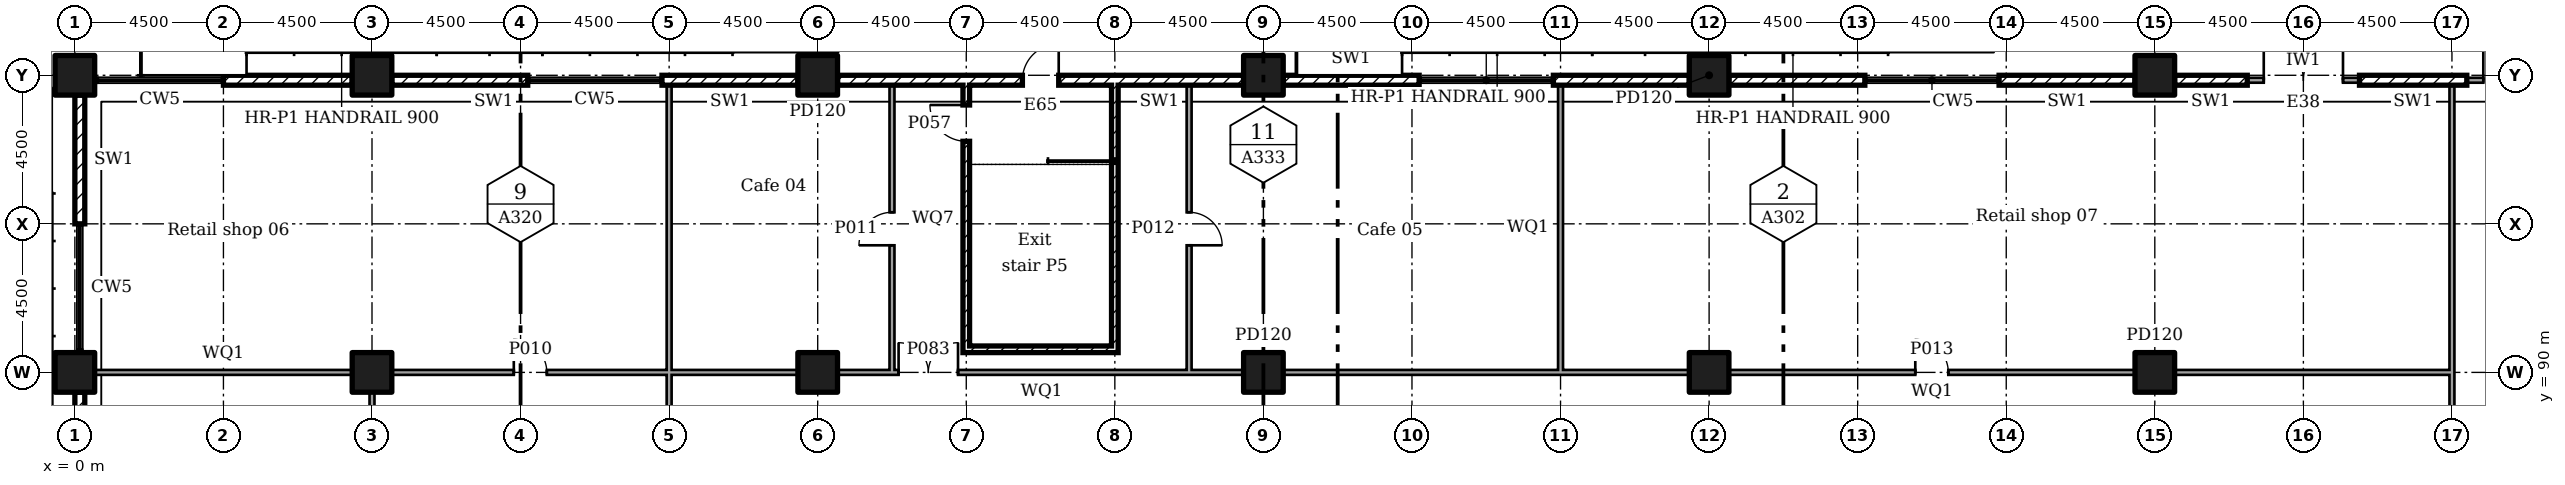
"""IFC4 building model, lengths in metres.
Left out: names, types, materials, properties, quantities, classifications, styles, units other than length and angle.
Written with IfcOpenShell. Run it as: python <this file> out.ifc"""

import sys

from ifc_helpers import new_model, si_unit, direction, frame, frame_2d, origin, origin_2d, place, context, subcontext, project, spatial, rectangle, extrude, element, fill, save


model = new_model("IFC4")
c1 = context("Model", 3, precision=1e-05, world=origin(), true_north=direction((0.0, 1.0)))
c2 = subcontext(c1, "Body", "Model", "MODEL_VIEW")
j1 = project(units=[si_unit("LENGTHUNIT", "METRE"), si_unit("PLANEANGLEUNIT", "RADIAN")], contexts=[c1])
p1 = place(None, origin())
s1 = spatial("IfcSite", under=j1, at=p1, CompositionType="ELEMENT")
p2 = place(p1, origin())
s2 = spatial("IfcBuilding", under=s1, at=p2, CompositionType="ELEMENT")
p3 = place(p2, origin())
s3 = spatial("IfcBuildingStorey", under=s2, at=p3, CompositionType="ELEMENT", Elevation=0.0)
for number, where in (
    (1, (0.0, 90.0, 0.0)),
    (2, (0.0, 99.0, 0.0)),
    (3, (9.0, 90.0, 0.0)),
    (4, (9.0, 99.0, 0.0)),
    (5, (22.5, 90.0, 0.0)),
    (6, (22.5, 99.0, 0.0)),
    (7, (36.0, 90.0, 0.0)),
    (8, (36.0, 99.0, 0.0)),
    (9, (49.5, 90.0, 0.0)),
    (10, (49.5, 99.0, 0.0)),
    (11, (63.0, 90.0, 0.0)),
    (12, (63.0, 99.0, 0.0)),
):
    element("IfcColumn", number, at=place(p3, frame(where)), inside=s3, PredefinedType="COLUMN", context=c2, shape_type="SweptSolid", body=[
        extrude(rectangle(XDim=1.2, YDim=1.2, at=origin_2d()), origin(), (0.0, 0.0, 1.0), 6.0),
    ])
p4 = place(p3, frame((75.9, 98.85, 0.0), z_axis=(0.0, 0.0, 1.0), x_axis=(-1.0, 0.0, 0.0)))
e13 = element("IfcWall", 13, at=p4, inside=s3, PredefinedType="SOLIDWALL", context=c2, shape_type="SweptSolid", body=[
    extrude(rectangle(XDim=3.45, YDim=0.15, at=frame_2d((1.725, 0.0))), origin(), (0.0, 0.0, 1.0), 5.55),
])
p5 = place(p4, frame((0.55, 0.0, 0.0)))
e14 = element("IfcOpeningElement", 14, at=p5, cuts=e13, PredefinedType="OPENING", context=c2, shape_type="SweptSolid", body=[
    extrude(rectangle(XDim=2.4, YDim=2.7, at=frame_2d((1.2, 1.35))), frame((0.0, 0.085, 0.0), z_axis=(0.0, -1.0, 0.0), x_axis=(1.0, 0.0, 0.0)), (0.0, 0.0, 1.0), 0.17),
])
p6 = place(p3, frame((72.45, 98.85, 0.0), z_axis=(0.0, 0.0, 1.0), x_axis=(-1.0, 0.0, 0.0)))
e15 = element("IfcWall", 15, at=p6, inside=s3, PredefinedType="ELEMENTEDWALL", context=c2, shape_type="SweptSolid", body=[
    extrude(rectangle(XDim=3.25, YDim=0.3, at=frame_2d((1.625, 0.0))), origin(), (0.0, 0.0, 1.0), 5.55),
])
p7 = place(p3, frame((69.2, 98.85, 0.0), z_axis=(0.0, 0.0, 1.0), x_axis=(-1.0, 0.0, 0.0)))
e16 = element("IfcWall", 16, at=p7, inside=s3, PredefinedType="SOLIDWALL", context=c2, shape_type="SweptSolid", body=[
    extrude(rectangle(XDim=3.4, YDim=0.15, at=frame_2d((1.7, 0.0))), origin(), (0.0, 0.0, 1.0), 5.55),
])
p8 = place(p7, frame((0.5, 0.0, 0.0)))
e17 = element("IfcOpeningElement", 17, at=p8, cuts=e16, PredefinedType="OPENING", context=c2, shape_type="SweptSolid", body=[
    extrude(rectangle(XDim=2.4, YDim=2.7, at=frame_2d((1.2, 1.35))), frame((0.0, 0.085, 0.0), z_axis=(0.0, -1.0, 0.0), x_axis=(1.0, 0.0, 0.0)), (0.0, 0.0, 1.0), 0.17),
])
p9 = place(p3, frame((65.8, 98.85, 0.0), z_axis=(0.0, 0.0, 1.0), x_axis=(-1.0, 0.0, 0.0)))
e18 = element("IfcWall", 18, at=p9, inside=s3, PredefinedType="ELEMENTEDWALL", context=c2, shape_type="SweptSolid", body=[
    extrude(rectangle(XDim=2.2, YDim=0.3, at=frame_2d((1.1, 0.0))), origin(), (0.0, 0.0, 1.0), 5.55),
])
for number, where, z_axis, x_axis in (
    (19, (62.4, 98.85, 0.0), (0.0, 0.0, 1.0), (-1.0, 0.0, 0.0)),
    (20, (54.217, 98.85, 0.0), (0.0, 0.0, 1.0), (-1.0, 0.0, 0.0)),
    (21, (48.9, 98.85, 0.0), (0.0, 0.0, 1.0), (-1.0, 0.0, 0.0)),
    (22, (40.717, 98.85, 0.0), (0.0, 0.0, 1.0), (-1.0, 0.0, 0.0)),
):
    element("IfcWall", number, at=place(p3, frame(where, z_axis=z_axis, x_axis=x_axis)), inside=s3, PredefinedType="ELEMENTEDWALL", context=c2, shape_type="SweptSolid", body=[
        extrude(rectangle(XDim=4.116, YDim=0.3, at=frame_2d((2.058, 0.0))), origin(), (0.0, 0.0, 1.0), 5.55),
    ])
p10 = place(p3, frame((35.4, 98.85, 0.0), z_axis=(0.0, 0.0, 1.0), x_axis=(-1.0, 0.0, 0.0)))
e23 = element("IfcWall", 23, at=p10, inside=s3, PredefinedType="ELEMENTEDWALL", context=c2, shape_type="SweptSolid", body=[
    extrude(rectangle(XDim=5.1, YDim=0.3, at=frame_2d((2.55, 0.0))), origin(), (0.0, 0.0, 1.0), 5.55),
])
p11 = place(p3, frame((30.3, 98.85, 0.0), z_axis=(0.0, 0.0, 1.0), x_axis=(-1.0, 0.0, 0.0)))
e24 = element("IfcWall", 24, at=p11, inside=s3, PredefinedType="ELEMENTEDWALL", context=c2, shape_type="SweptSolid", body=[
    extrude(rectangle(XDim=2.1, YDim=0.3, at=frame_2d((1.05, 0.0))), origin(), (0.0, 0.0, 1.0), 5.55),
])
p12 = place(p11, frame((0.5, 0.0, 0.0)))
e25 = element("IfcOpeningElement", 25, at=p12, cuts=e24, PredefinedType="OPENING", context=c2, shape_type="SweptSolid", body=[
    extrude(rectangle(XDim=1.1, YDim=2.4, at=frame_2d((0.55, 1.2))), frame((0.0, 0.16, 0.0), z_axis=(0.0, -1.0, 0.0), x_axis=(1.0, 0.0, 0.0)), (0.0, 0.0, 1.0), 0.32),
])
p13 = place(p3, frame((28.2, 98.85, 0.0), z_axis=(0.0, 0.0, 1.0), x_axis=(-1.0, 0.0, 0.0)))
e26 = element("IfcWall", 26, at=p13, inside=s3, PredefinedType="ELEMENTEDWALL", context=c2, shape_type="SweptSolid", body=[
    extrude(rectangle(XDim=5.1, YDim=0.3, at=frame_2d((2.55, 0.0))), origin(), (0.0, 0.0, 1.0), 5.55),
])
for number, where, z_axis, x_axis in (
    (27, (21.9, 98.85, 0.0), (0.0, 0.0, 1.0), (-1.0, 0.0, 0.0)),
    (28, (13.717, 98.85, 0.0), (0.0, 0.0, 1.0), (-1.0, 0.0, 0.0)),
):
    element("IfcWall", number, at=place(p3, frame(where, z_axis=z_axis, x_axis=x_axis)), inside=s3, PredefinedType="ELEMENTEDWALL", context=c2, shape_type="SweptSolid", body=[
        extrude(rectangle(XDim=4.116, YDim=0.3, at=frame_2d((2.058, 0.0))), origin(), (0.0, 0.0, 1.0), 5.55),
    ])
for number, where, z_axis, x_axis in (
    (29, (8.4, 98.85, 0.0), (0.0, 0.0, 1.0), (-1.0, 0.0, 0.0)),
    (30, (0.15, 98.4, 0.0), (0.0, 0.0, 1.0), (0.0, -1.0, 0.0)),
):
    element("IfcWall", number, at=place(p3, frame(where, z_axis=z_axis, x_axis=x_axis)), inside=s3, PredefinedType="ELEMENTEDWALL", context=c2, shape_type="SweptSolid", body=[
        extrude(rectangle(XDim=3.9, YDim=0.3, at=frame_2d((1.95, 0.0))), origin(), (0.0, 0.0, 1.0), 5.55),
    ])
p14 = place(p3, frame((0.15, 89.4, 0.0), z_axis=(0.0, 0.0, 1.0), x_axis=(0.0, -1.0, 0.0)))
e31 = element("IfcWall", 31, at=p14, inside=s3, PredefinedType="ELEMENTEDWALL", context=c2, shape_type="SweptSolid", body=[
    extrude(rectangle(XDim=4.116, YDim=0.3, at=frame_2d((2.058, 0.0))), origin(), (0.0, 0.0, 1.0), 5.55),
])
p15 = place(p3, frame((72.0, 80.925, 0.0), z_axis=(0.0, 0.0, 1.0), x_axis=(0.0, 1.0, 0.0)))
e32 = element("IfcWall", 32, at=p15, inside=s3, PredefinedType="PARTITIONING", context=c2, shape_type="SweptSolid", body=[
    extrude(rectangle(XDim=9.15, YDim=0.15, at=frame_2d((4.575, 0.0))), origin(), (0.0, 0.0, 1.0), 5.55),
])
p16 = place(p15, frame((3.675, 0.0, 0.0)))
e33 = element("IfcOpeningElement", 33, at=p16, cuts=e32, PredefinedType="OPENING", context=c2, shape_type="SweptSolid", body=[
    extrude(rectangle(XDim=1.8, YDim=2.1, at=frame_2d((0.9, 1.05))), frame((0.0, 0.085, 0.0), z_axis=(0.0, -1.0, 0.0), x_axis=(1.0, 0.0, 0.0)), (0.0, 0.0, 1.0), 0.17),
])
p17 = place(p3, frame((72.0, 90.0, 0.0), z_axis=(0.0, 0.0, 1.0), x_axis=(0.0, 1.0, 0.0)))
e34 = element("IfcWall", 34, at=p17, inside=s3, PredefinedType="PARTITIONING", context=c2, shape_type="SweptSolid", body=[
    extrude(rectangle(XDim=8.7, YDim=0.15, at=frame_2d((4.35, 0.0))), origin(), (0.0, 0.0, 1.0), 5.55),
])
p18 = place(p3, frame((18.0, 80.925, 0.0), z_axis=(0.0, 0.0, 1.0), x_axis=(0.0, 1.0, 0.0)))
e35 = element("IfcWall", 35, at=p18, inside=s3, PredefinedType="PARTITIONING", context=c2, shape_type="SweptSolid", body=[
    extrude(rectangle(XDim=9.15, YDim=0.15, at=frame_2d((4.575, 0.0))), origin(), (0.0, 0.0, 1.0), 5.55),
])
p19 = place(p18, frame((3.675, 0.0, 0.0)))
e36 = element("IfcOpeningElement", 36, at=p19, cuts=e35, PredefinedType="OPENING", context=c2, shape_type="SweptSolid", body=[
    extrude(rectangle(XDim=1.8, YDim=2.1, at=frame_2d((0.9, 1.05))), frame((0.0, 0.085, 0.0), z_axis=(0.0, -1.0, 0.0), x_axis=(1.0, 0.0, 0.0)), (0.0, 0.0, 1.0), 0.17),
])
p20 = place(p3, frame((9.0, 77.095, 0.0), z_axis=(0.0, 0.0, 1.0), x_axis=(0.0, 1.0, 0.0)))
e37 = element("IfcWall", 37, at=p20, inside=s3, PredefinedType="PARTITIONING", context=c2, shape_type="SweptSolid", body=[
    extrude(rectangle(XDim=12.31, YDim=0.15, at=frame_2d((6.155, 0.0))), origin(), (0.0, 0.0, 1.0), 5.55),
])
p21 = place(p20, frame((5.65, 0.0, 0.0)))
e38 = element("IfcOpeningElement", 38, at=p21, cuts=e37, PredefinedType="OPENING", context=c2, shape_type="SweptSolid", body=[
    extrude(rectangle(XDim=1.0, YDim=2.1, at=frame_2d((0.5, 1.05))), frame((0.0, 0.085, 0.0), z_axis=(0.0, -1.0, 0.0), x_axis=(1.0, 0.0, 0.0)), (0.0, 0.0, 1.0), 0.17),
])
p22 = place(p3, frame((9.595, 90.0, 0.0)))
e39 = element("IfcWall", 39, at=p22, inside=s3, PredefinedType="PARTITIONING", context=c2, shape_type="SweptSolid", body=[
    extrude(rectangle(XDim=8.48, YDim=0.15, at=frame_2d((4.24, 0.0))), origin(), (0.0, 0.0, 1.0), 5.55),
])
p23 = place(p22, frame((3.7, 0.0, 0.0)))
e40 = element("IfcOpeningElement", 40, at=p23, cuts=e39, PredefinedType="OPENING", context=c2, shape_type="SweptSolid", body=[
    extrude(rectangle(XDim=1.0, YDim=2.1, at=frame_2d((0.5, 1.05))), frame((0.0, 0.085, 0.0), z_axis=(0.0, -1.0, 0.0), x_axis=(1.0, 0.0, 0.0)), (0.0, 0.0, 1.0), 0.17),
])
p24 = place(p3, frame((18.075, 90.0, 0.0)))
e41 = element("IfcWall", 41, at=p24, inside=s3, PredefinedType="PARTITIONING", context=c2, shape_type="SweptSolid", body=[
    extrude(rectangle(XDim=3.83, YDim=0.15, at=frame_2d((1.915, 0.0))), origin(), (0.0, 0.0, 1.0), 5.55),
])
p25 = place(p3, frame((23.095, 90.0, 0.0)))
e42 = element("IfcWall", 42, at=p25, inside=s3, PredefinedType="PARTITIONING", context=c2, shape_type="SweptSolid", body=[
    extrude(rectangle(XDim=1.73, YDim=0.15, at=frame_2d((0.865, 0.0))), origin(), (0.0, 0.0, 1.0), 5.55),
])
p26 = place(p3, frame((24.75, 90.0, 0.0)))
e43 = element("IfcWall", 43, at=p26, inside=s3, PredefinedType="PARTITIONING", context=c2, shape_type="SweptSolid", body=[
    extrude(rectangle(XDim=9.075, YDim=0.15, at=frame_2d((4.538, 0.0))), origin(), (0.0, 0.0, 1.0), 5.55),
])
p27 = place(p26, frame((0.2, 0.0, 0.0)))
e44 = element("IfcOpeningElement", 44, at=p27, cuts=e43, PredefinedType="OPENING", context=c2, shape_type="SweptSolid", body=[
    extrude(rectangle(XDim=1.8, YDim=2.1, at=frame_2d((0.9, 1.05))), frame((0.0, 0.085, 0.0), z_axis=(0.0, -1.0, 0.0), x_axis=(1.0, 0.0, 0.0)), (0.0, 0.0, 1.0), 0.17),
])
p28 = place(p3, frame((33.75, 90.0, 0.0)))
e45 = element("IfcWall", 45, at=p28, inside=s3, PredefinedType="PARTITIONING", context=c2, shape_type="SweptSolid", body=[
    extrude(rectangle(XDim=1.655, YDim=0.15, at=frame_2d((0.828, 0.0))), origin(), (0.0, 0.0, 1.0), 5.55),
])
p29 = place(p3, frame((36.595, 90.0, 0.0)))
e46 = element("IfcWall", 46, at=p29, inside=s3, PredefinedType="PARTITIONING", context=c2, shape_type="SweptSolid", body=[
    extrude(rectangle(XDim=8.48, YDim=0.15, at=frame_2d((4.24, 0.0))), origin(), (0.0, 0.0, 1.0), 5.55),
])
p30 = place(p3, frame((45.0, 90.0, 0.0)))
e47 = element("IfcWall", 47, at=p30, inside=s3, PredefinedType="PARTITIONING", context=c2, shape_type="SweptSolid", body=[
    extrude(rectangle(XDim=3.905, YDim=0.15, at=frame_2d((1.953, 0.0))), origin(), (0.0, 0.0, 1.0), 5.55),
])
p31 = place(p3, frame((50.095, 90.0, 0.0)))
e48 = element("IfcWall", 48, at=p31, inside=s3, PredefinedType="PARTITIONING", context=c2, shape_type="SweptSolid", body=[
    extrude(rectangle(XDim=12.31, YDim=0.15, at=frame_2d((6.155, 0.0))), origin(), (0.0, 0.0, 1.0), 5.55),
])
p32 = place(p31, frame((5.65, 0.0, 0.0)))
e49 = element("IfcOpeningElement", 49, at=p32, cuts=e48, PredefinedType="OPENING", context=c2, shape_type="SweptSolid", body=[
    extrude(rectangle(XDim=1.0, YDim=2.1, at=frame_2d((0.5, 1.05))), frame((0.0, 0.085, 0.0), z_axis=(0.0, -1.0, 0.0), x_axis=(1.0, 0.0, 0.0)), (0.0, 0.0, 1.0), 0.17),
])
p33 = place(p3, frame((63.595, 90.0, 0.0)))
e50 = element("IfcWall", 50, at=p33, inside=s3, PredefinedType="PARTITIONING", context=c2, shape_type="SweptSolid", body=[
    extrude(rectangle(XDim=8.33, YDim=0.15, at=frame_2d((4.165, 0.0))), origin(), (0.0, 0.0, 1.0), 5.55),
])
p34 = place(p3, frame((0.595, 90.0, 0.0)))
e51 = element("IfcWall", 51, at=p34, inside=s3, PredefinedType="PARTITIONING", context=c2, shape_type="SweptSolid", body=[
    extrude(rectangle(XDim=7.81, YDim=0.15, at=frame_2d((3.905, 0.0))), origin(), (0.0, 0.0, 1.0), 5.55),
])
p35 = place(p3, frame((18.0, 90.075, 0.0), z_axis=(0.0, 0.0, 1.0), x_axis=(0.0, 1.0, 0.0)))
e52 = element("IfcWall", 52, at=p35, inside=s3, PredefinedType="PARTITIONING", context=c2, shape_type="SweptSolid", body=[
    extrude(rectangle(XDim=8.625, YDim=0.15, at=frame_2d((4.312, 0.0))), origin(), (0.0, 0.0, 1.0), 5.55),
])
p36 = place(p3, frame((24.75, 90.075, 0.0), z_axis=(0.0, 0.0, 1.0), x_axis=(0.0, 1.0, 0.0)))
e53 = element("IfcWall", 53, at=p36, inside=s3, PredefinedType="PARTITIONING", context=c2, shape_type="SweptSolid", body=[
    extrude(rectangle(XDim=8.625, YDim=0.15, at=frame_2d((4.312, 0.0))), origin(), (0.0, 0.0, 1.0), 5.55),
])
p37 = place(p36, frame((3.775, 0.0, 0.0)))
e54 = element("IfcOpeningElement", 54, at=p37, cuts=e53, PredefinedType="OPENING", context=c2, shape_type="SweptSolid", body=[
    extrude(rectangle(XDim=1.0, YDim=2.1, at=frame_2d((0.5, 1.05))), frame((0.0, 0.085, 0.0), z_axis=(0.0, -1.0, 0.0), x_axis=(1.0, 0.0, 0.0)), (0.0, 0.0, 1.0), 0.17),
])
p38 = place(p3, frame((33.75, 90.075, 0.0), z_axis=(0.0, 0.0, 1.0), x_axis=(0.0, 1.0, 0.0)))
e55 = element("IfcWall", 55, at=p38, inside=s3, PredefinedType="PARTITIONING", context=c2, shape_type="SweptSolid", body=[
    extrude(rectangle(XDim=8.625, YDim=0.15, at=frame_2d((4.312, 0.0))), origin(), (0.0, 0.0, 1.0), 5.55),
])
p39 = place(p38, frame((3.775, 0.0, 0.0)))
e56 = element("IfcOpeningElement", 56, at=p39, cuts=e55, PredefinedType="OPENING", context=c2, shape_type="SweptSolid", body=[
    extrude(rectangle(XDim=1.0, YDim=2.1, at=frame_2d((0.5, 1.05))), frame((0.0, 0.085, 0.0), z_axis=(0.0, -1.0, 0.0), x_axis=(1.0, 0.0, 0.0)), (0.0, 0.0, 1.0), 0.17),
])
p40 = place(p3, frame((27.0, 90.6, 0.0), z_axis=(0.0, 0.0, 1.0), x_axis=(0.0, 1.0, 0.0)))
e57 = element("IfcWall", 57, at=p40, inside=s3, PredefinedType="SOLIDWALL", context=c2, shape_type="SweptSolid", body=[
    extrude(rectangle(XDim=8.1, YDim=0.2, at=frame_2d((4.05, 0.0))), origin(), (0.0, 0.0, 1.0), 5.55),
])
p41 = place(p40, frame((6.4, 0.0, 0.0)))
e58 = element("IfcOpeningElement", 58, at=p41, cuts=e57, PredefinedType="OPENING", context=c2, shape_type="SweptSolid", body=[
    extrude(rectangle(XDim=1.1, YDim=2.1, at=frame_2d((0.55, 1.05))), frame((0.0, 0.11, 0.0), z_axis=(0.0, -1.0, 0.0), x_axis=(1.0, 0.0, 0.0)), (0.0, 0.0, 1.0), 0.22),
])
p42 = place(p3, frame((31.5, 90.6, 0.0), z_axis=(0.0, 0.0, 1.0), x_axis=(0.0, 1.0, 0.0)))
e59 = element("IfcWall", 59, at=p42, inside=s3, PredefinedType="SOLIDWALL", context=c2, shape_type="SweptSolid", body=[
    extrude(rectangle(XDim=8.1, YDim=0.2, at=frame_2d((4.05, 0.0))), origin(), (0.0, 0.0, 1.0), 5.55),
])
p43 = place(p3, frame((27.1, 90.7, 0.0)))
e60 = element("IfcWall", 60, at=p43, inside=s3, PredefinedType="SOLIDWALL", context=c2, shape_type="SweptSolid", body=[
    extrude(rectangle(XDim=4.3, YDim=0.2, at=frame_2d((2.15, 0.0))), origin(), (0.0, 0.0, 1.0), 5.55),
])
p44 = place(p3, frame((45.0, 90.075, 0.0), z_axis=(0.0, 0.0, 1.0), x_axis=(0.0, 1.0, 0.0)))
e61 = element("IfcWall", 61, at=p44, inside=s3, PredefinedType="PARTITIONING", context=c2, shape_type="SweptSolid", body=[
    extrude(rectangle(XDim=8.625, YDim=0.15, at=frame_2d((4.312, 0.0))), origin(), (0.0, 0.0, 1.0), 5.55),
])
p45 = place(p5, frame((2.4, 0.0, 0.0), x_axis=(-1.0, 0.0, 0.0)))
e62 = element("IfcDoor", 62, at=p45, inside=s3, OperationType="DOUBLE_DOOR_DOUBLE_SWING", PredefinedType="NOTDEFINED", context=c2, shape_type="SweptSolid", body=[
    extrude(rectangle(XDim=2.4, YDim=2.7, at=frame_2d((1.2, 1.35))), frame((0.0, 0.025, 0.0), z_axis=(0.0, -1.0, 0.0), x_axis=(1.0, 0.0, 0.0)), (0.0, 0.0, 1.0), 0.05),
])
fill(e14, e62)
p46 = place(p8, frame((2.4, 0.0, 0.0), x_axis=(-1.0, 0.0, 0.0)))
e63 = element("IfcDoor", 63, at=p46, inside=s3, OperationType="DOUBLE_DOOR_DOUBLE_SWING", PredefinedType="NOTDEFINED", context=c2, shape_type="SweptSolid", body=[
    extrude(rectangle(XDim=2.4, YDim=2.7, at=frame_2d((1.2, 1.35))), frame((0.0, 0.025, 0.0), z_axis=(0.0, -1.0, 0.0), x_axis=(1.0, 0.0, 0.0)), (0.0, 0.0, 1.0), 0.05),
])
fill(e17, e63)
p47 = place(p12, frame((1.1, 0.0, 0.0), x_axis=(-1.0, 0.0, 0.0)))
e64 = element("IfcDoor", 64, at=p47, inside=s3, OperationType="SINGLE_SWING_LEFT", PredefinedType="NOTDEFINED", context=c2, shape_type="SweptSolid", body=[
    extrude(rectangle(XDim=1.1, YDim=2.4, at=frame_2d((0.55, 1.2))), frame((0.0, 0.025, 0.0), z_axis=(0.0, -1.0, 0.0), x_axis=(1.0, 0.0, 0.0)), (0.0, 0.0, 1.0), 0.05),
])
fill(e25, e64)
p48 = place(p23, origin())
e65 = element("IfcDoor", 65, at=p48, inside=s3, OperationType="SINGLE_SWING_RIGHT", PredefinedType="DOOR", context=c2, shape_type="SweptSolid", body=[
    extrude(rectangle(XDim=1.0, YDim=2.1, at=frame_2d((0.5, 1.05))), frame((0.0, 0.025, 0.0), z_axis=(0.0, -1.0, 0.0), x_axis=(1.0, 0.0, 0.0)), (0.0, 0.0, 1.0), 0.05),
])
fill(e40, e65)
p49 = place(p37, origin())
e66 = element("IfcDoor", 66, at=p49, inside=s3, OperationType="SINGLE_SWING_RIGHT", PredefinedType="DOOR", context=c2, shape_type="SweptSolid", body=[
    extrude(rectangle(XDim=1.0, YDim=2.1, at=frame_2d((0.5, 1.05))), frame((0.0, 0.025, 0.0), z_axis=(0.0, -1.0, 0.0), x_axis=(1.0, 0.0, 0.0)), (0.0, 0.0, 1.0), 0.05),
])
fill(e54, e66)
p50 = place(p39, frame((1.0, 0.0, 0.0), x_axis=(-1.0, 0.0, 0.0)))
e67 = element("IfcDoor", 67, at=p50, inside=s3, OperationType="SINGLE_SWING_LEFT", PredefinedType="DOOR", context=c2, shape_type="SweptSolid", body=[
    extrude(rectangle(XDim=1.0, YDim=2.1, at=frame_2d((0.5, 1.05))), frame((0.0, 0.025, 0.0), z_axis=(0.0, -1.0, 0.0), x_axis=(1.0, 0.0, 0.0)), (0.0, 0.0, 1.0), 0.05),
])
fill(e56, e67)
p51 = place(p32, origin())
e68 = element("IfcDoor", 68, at=p51, inside=s3, OperationType="SINGLE_SWING_RIGHT", PredefinedType="DOOR", context=c2, shape_type="SweptSolid", body=[
    extrude(rectangle(XDim=1.0, YDim=2.1, at=frame_2d((0.5, 1.05))), frame((0.0, 0.025, 0.0), z_axis=(0.0, -1.0, 0.0), x_axis=(1.0, 0.0, 0.0)), (0.0, 0.0, 1.0), 0.05),
])
fill(e49, e68)
p52 = place(p41, origin())
e69 = element("IfcDoor", 69, at=p52, inside=s3, OperationType="SINGLE_SWING_LEFT", PredefinedType="DOOR", context=c2, shape_type="SweptSolid", body=[
    extrude(rectangle(XDim=1.1, YDim=2.1, at=frame_2d((0.55, 1.05))), frame((0.0, 0.025, 0.0), z_axis=(0.0, -1.0, 0.0), x_axis=(1.0, 0.0, 0.0)), (0.0, 0.0, 1.0), 0.05),
])
fill(e58, e69)
p53 = place(p27, origin())
e70 = element("IfcDoor", 70, at=p53, inside=s3, OperationType="DOUBLE_DOOR_SINGLE_SWING", PredefinedType="DOOR", context=c2, shape_type="SweptSolid", body=[
    extrude(rectangle(XDim=1.8, YDim=2.1, at=frame_2d((0.9, 1.05))), frame((0.0, 0.025, 0.0), z_axis=(0.0, -1.0, 0.0), x_axis=(1.0, 0.0, 0.0)), (0.0, 0.0, 1.0), 0.05),
])
fill(e44, e70)
save(model, sys.argv[1])
